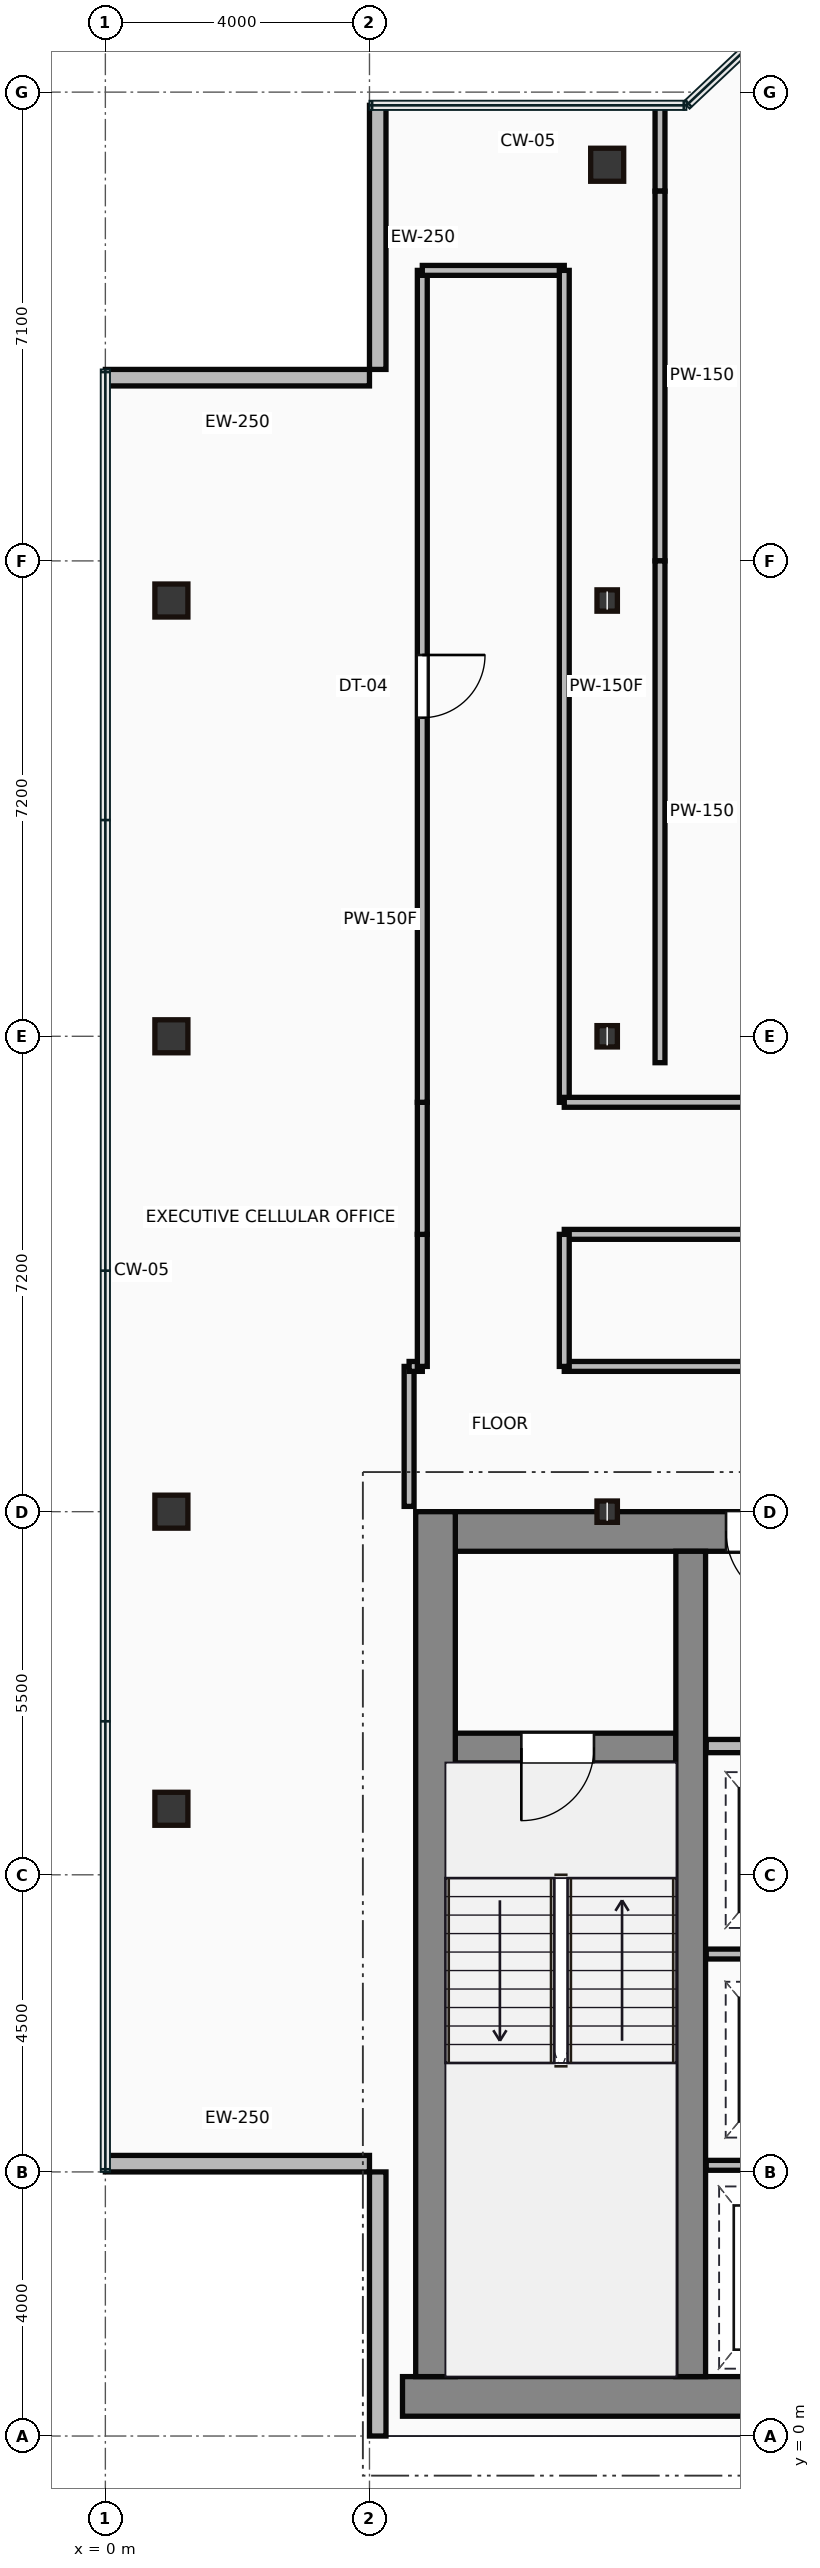
"""IFC4 building model, lengths in metres.
Left out: names, types, materials, properties, quantities, classifications, styles, units other than length and angle.
Written with IfcOpenShell. Run it as: python <this file> out.ifc"""

import sys

from ifc_helpers import new_model, si_unit, direction, frame, frame_2d, origin, origin_2d, place, context, subcontext, project, spatial, rectangle, hollow_rectangle, i_section, extrude, source, transform, mapped, element, fill, save


model = new_model("IFC4")
c1 = context("Model", 3, precision=1e-05, world=origin(), true_north=direction((0.0, 1.0)))
c2 = subcontext(c1, "Body", "Model", "MODEL_VIEW")
j1 = project(units=[si_unit("LENGTHUNIT", "METRE"), si_unit("PLANEANGLEUNIT", "RADIAN")], contexts=[c1])
p1 = place(None, origin())
s1 = spatial("IfcSite", under=j1, at=p1, CompositionType="ELEMENT")
p2 = place(p1, origin())
s2 = spatial("IfcBuilding", under=s1, at=p2, CompositionType="ELEMENT")
p3 = place(p2, frame((0.0, 0.0, 284.35)))
s3 = spatial("IfcBuildingStorey", under=s2, at=p3, CompositionType="ELEMENT", Elevation=284.35)
m1 = source(origin(), c2, "Body", "SweptSolid", [
    extrude(rectangle(XDim=29.5, YDim=0.6, at=frame_2d((14.75, 0.0))), origin(), (0.0, 0.0, 1.0), 3.65),
])
p4 = place(p3, frame((4.5, 0.6, 0.0), z_axis=(0.0, 0.0, 1.0), x_axis=(1.0, 0.0, 0.0)))
e1 = element("IfcWall", 1, at=p4, inside=s3, PredefinedType="SHEAR", context=c2, shape_type="MappedRepresentation", body=[
    mapped(m1, transform((0.0, 0.0, 0.0))),
])
m2 = source(origin(), c2, "Body", "SweptSolid", [
    extrude(rectangle(XDim=13.1, YDim=0.6, at=frame_2d((6.55, 0.0))), origin(), (0.0, 0.0, 1.0), 3.65),
])
p5 = place(p3, frame((5.0, 0.9, 0.0), z_axis=(0.0, 0.0, 1.0), x_axis=(0.0, 1.0, 0.0)))
e2 = element("IfcWall", 2, at=p5, inside=s3, PredefinedType="SHEAR", context=c2, shape_type="MappedRepresentation", body=[
    mapped(m2, transform((0.0, 0.0, 0.0))),
])
m3 = source(origin(), c2, "Body", "SweptSolid", [
    extrude(rectangle(XDim=9.1, YDim=0.6, at=frame_2d((4.55, 0.0))), origin(), (0.0, 0.0, 1.0), 3.65),
])
p6 = place(p3, frame((5.3, 13.7, 0.0), z_axis=(0.0, 0.0, 1.0), x_axis=(1.0, 0.0, 0.0)))
e3 = element("IfcWall", 3, at=p6, inside=s3, PredefinedType="SHEAR", context=c2, shape_type="MappedRepresentation", body=[
    mapped(m3, transform((0.0, 0.0, 0.0))),
])
p7 = place(p6, frame((4.1, 0.0, 0.0)))
e4 = element("IfcOpeningElement", 4, at=p7, cuts=e3, PredefinedType="OPENING", context=c2, shape_type="SweptSolid", body=[
    extrude(rectangle(XDim=1.1, YDim=2.15, at=frame_2d((0.55, 1.075))), frame((0.0, 0.31, 0.0), z_axis=(0.0, -1.0, 0.0), x_axis=(1.0, 0.0, 0.0)), (0.0, 0.0, 1.0), 0.62),
])
m4 = source(origin(), c2, "Body", "SweptSolid", [
    extrude(rectangle(XDim=12.5, YDim=0.45, at=frame_2d((6.25, 0.0))), origin(), (0.0, 0.0, 1.0), 3.65),
])
p8 = place(p3, frame((8.865, 0.9, 0.0), z_axis=(0.0, 0.0, 1.0), x_axis=(0.0, 1.0, 0.0)))
e5 = element("IfcWall", 5, at=p8, inside=s3, PredefinedType="SHEAR", context=c2, shape_type="MappedRepresentation", body=[
    mapped(m4, transform((0.0, 0.0, 0.0))),
])
m5 = source(origin(), c2, "Body", "SweptSolid", [
    extrude(rectangle(XDim=3.39, YDim=0.45, at=frame_2d((1.695, 0.0))), origin(), (0.0, 0.0, 1.0), 3.65),
])
p9 = place(p3, frame((5.25, 10.42, 0.0), z_axis=(0.0, 0.0, 1.0), x_axis=(1.0, 0.0, 0.0)))
e6 = element("IfcWall", 6, at=p9, inside=s3, PredefinedType="SHEAR", context=c2, shape_type="MappedRepresentation", body=[
    mapped(m5, transform((0.0, 0.0, 0.0))),
])
p10 = place(p9, frame((1.05, 0.0, 0.0)))
e7 = element("IfcOpeningElement", 7, at=p10, cuts=e6, PredefinedType="OPENING", context=c2, shape_type="SweptSolid", body=[
    extrude(rectangle(XDim=1.1, YDim=2.15, at=frame_2d((0.55, 1.075))), frame((0.0, 0.235, 0.0), z_axis=(0.0, -1.0, 0.0), x_axis=(1.0, 0.0, 0.0)), (0.0, 0.0, 1.0), 0.47),
])
m6 = source(origin(), c2, "Body", "SweptSolid", [
    extrude(hollow_rectangle(XDim=0.5, YDim=0.5, WallThickness=0.022, at=origin_2d()), origin(), (0.0, 0.0, 1.0), 3.65),
])
for number, where, z_axis, x_axis in (
    (8, (1.0, 9.5, 0.0), (0.0, 0.0, 1.0), (1.0, 0.0, 0.0)),
    (9, (1.0, 14.0, 0.0), (0.0, 0.0, 1.0), (1.0, 0.0, 0.0)),
    (10, (1.0, 21.2, 0.0), (0.0, 0.0, 1.0), (1.0, 0.0, 0.0)),
    (11, (1.0, 27.8, 0.0), (0.0, 0.0, 1.0), (1.0, 0.0, 0.0)),
):
    element("IfcColumn", number, at=place(p3, frame(where, z_axis=z_axis, x_axis=x_axis)), inside=s3, PredefinedType="COLUMN", context=c2, shape_type="MappedRepresentation", body=[
        mapped(m6, transform((0.0, 0.0, 0.0))),
    ])
m7 = source(origin(), c2, "Body", "SweptSolid", [
    extrude(i_section(OverallWidth=0.309, OverallDepth=0.323, WebThickness=0.014, FlangeThickness=0.023, at=origin_2d()), origin(), (0.0, 0.0, 1.0), 3.65),
])
for number, where, z_axis, x_axis in (
    (12, (7.6, 14.0, 0.0), (0.0, 0.0, 1.0), (1.0, 0.0, 0.0)),
    (13, (7.6, 21.2, 0.0), (0.0, 0.0, 1.0), (1.0, 0.0, 0.0)),
    (14, (7.6, 27.8, 0.0), (0.0, 0.0, 1.0), (1.0, 0.0, 0.0)),
):
    element("IfcColumn", number, at=place(p3, frame(where, z_axis=z_axis, x_axis=x_axis)), inside=s3, PredefinedType="COLUMN", context=c2, shape_type="MappedRepresentation", body=[
        mapped(m7, transform((0.0, 0.0, 0.0))),
    ])
p11 = place(p3, frame((7.6, 34.4, 0.0), z_axis=(0.0, 0.0, 1.0), x_axis=(1.0, 0.0, 0.0)))
e15 = element("IfcColumn", 15, at=p11, inside=s3, PredefinedType="COLUMN", context=c2, shape_type="MappedRepresentation", body=[
    mapped(m6, transform((0.0, 0.0, 0.0))),
])
m8 = source(origin(), c2, "Body", "SweptSolid", [
    extrude(rectangle(XDim=4.0, YDim=0.25, at=frame_2d((2.0, 0.0))), origin(), (0.0, 0.0, 1.0), 3.4),
])
for number, where, z_axis, x_axis in (
    (16, (4.125, 35.3, 0.0), (0.0, 0.0, 1.0), (0.0, -1.0, 0.0)),
    (17, (4.0, 31.175, 0.0), (0.0, 0.0, 1.0), (-1.0, 0.0, 0.0)),
    (18, (0.0, 4.125, 0.0), (0.0, 0.0, 1.0), (1.0, 0.0, 0.0)),
    (19, (4.125, 4.0, 0.0), (0.0, 0.0, 1.0), (0.0, -1.0, 0.0)),
):
    element("IfcWall", number, at=place(p3, frame(where, z_axis=z_axis, x_axis=x_axis)), inside=s3, PredefinedType="STANDARD", context=c2, shape_type="MappedRepresentation", body=[
        mapped(m8, transform((0.0, 0.0, 0.0))),
    ])
m9 = source(origin(), c2, "Body", "SweptSolid", [
    extrude(rectangle(XDim=2.35, YDim=0.2, at=frame_2d((1.175, 0.0))), origin(), (0.0, 0.0, 1.0), 3.4),
])
p12 = place(p3, frame((9.1, 10.45, 0.0), z_axis=(0.0, 0.0, 1.0), x_axis=(1.0, 0.0, 0.0)))
e20 = element("IfcWall", 20, at=p12, inside=s3, PredefinedType="PARTITIONING", context=c2, shape_type="MappedRepresentation", body=[
    mapped(m9, transform((0.0, 0.0, 0.0))),
])
p13 = place(p12, frame((0.55, 0.0, 0.0)))
e21 = element("IfcOpeningElement", 21, at=p13, cuts=e20, PredefinedType="OPENING", context=c2, shape_type="SweptSolid", body=[
    extrude(rectangle(XDim=1.1, YDim=2.15, at=frame_2d((0.55, 1.075))), frame((0.0, 0.11, 0.0), z_axis=(0.0, -1.0, 0.0), x_axis=(1.0, 0.0, 0.0)), (0.0, 0.0, 1.0), 0.22),
])
m10 = source(origin(), c2, "Body", "SweptSolid", [
    extrude(rectangle(XDim=2.4, YDim=0.15, at=frame_2d((1.2, 0.0))), origin(), (0.0, 0.0, 1.0), 3.4),
])
for number, where, z_axis, x_axis in (
    (22, (9.1, 4.1, 0.0), (0.0, 0.0, 1.0), (1.0, 0.0, 0.0)),
    (23, (9.1, 7.3, 0.0), (0.0, 0.0, 1.0), (1.0, 0.0, 0.0)),
):
    element("IfcWall", number, at=place(p3, frame(where, z_axis=z_axis, x_axis=x_axis)), inside=s3, PredefinedType="PARTITIONING", context=c2, shape_type="MappedRepresentation", body=[
        mapped(m10, transform((0.0, 0.0, 0.0))),
    ])
m11 = source(origin(), c2, "Body", "SweptSolid", [
    extrude(rectangle(XDim=2.12, YDim=0.15, at=frame_2d((1.06, 0.0))), origin(), (0.0, 0.0, 1.0), 3.4),
])
p14 = place(p3, frame((4.6, 14.08, 0.0), z_axis=(0.0, 0.0, 1.0), x_axis=(0.0, 1.0, 0.0)))
e24 = element("IfcWall", 24, at=p14, inside=s3, PredefinedType="PARTITIONING", context=c2, shape_type="MappedRepresentation", body=[
    mapped(m11, transform((0.0, 0.0, 0.0))),
])
m12 = source(origin(), c2, "Body", "SweptSolid", [
    extrude(rectangle(XDim=0.2, YDim=0.15, at=frame_2d((0.1, 0.0))), origin(), (0.0, 0.0, 1.0), 3.4),
])
p15 = place(p3, frame((4.6, 16.2, 0.0), z_axis=(0.0, 0.0, 1.0), x_axis=(1.0, 0.0, 0.0)))
e25 = element("IfcWall", 25, at=p15, inside=s3, PredefinedType="PARTITIONING", context=c2, shape_type="MappedRepresentation", body=[
    mapped(m12, transform((0.0, 0.0, 0.0))),
])
m13 = source(origin(), c2, "Body", "SweptSolid", [
    extrude(rectangle(XDim=2.0, YDim=0.15, at=frame_2d((1.0, 0.0))), origin(), (0.0, 0.0, 1.0), 3.4),
])
for number, where, z_axis, x_axis in (
    (26, (4.8, 16.2, 0.0), (0.0, 0.0, 1.0), (0.0, 1.0, 0.0)),
    (27, (4.8, 18.2, 0.0), (0.0, 0.0, 1.0), (0.0, 1.0, 0.0)),
):
    element("IfcWall", number, at=place(p3, frame(where, z_axis=z_axis, x_axis=x_axis)), inside=s3, PredefinedType="PARTITIONING", context=c2, shape_type="MappedRepresentation", body=[
        mapped(m13, transform((0.0, 0.0, 0.0))),
    ])
m14 = source(origin(), c2, "Body", "SweptSolid", [
    extrude(rectangle(XDim=12.6, YDim=0.15, at=frame_2d((6.3, 0.0))), origin(), (0.0, 0.0, 1.0), 3.4),
])
p16 = place(p3, frame((4.8, 20.2, 0.0), z_axis=(0.0, 0.0, 1.0), x_axis=(0.0, 1.0, 0.0)))
e28 = element("IfcWall", 28, at=p16, inside=s3, PredefinedType="PARTITIONING", context=c2, shape_type="MappedRepresentation", body=[
    mapped(m14, transform((0.0, 0.0, 0.0))),
])
p17 = place(p16, frame((5.825, 0.0, 0.0)))
e29 = element("IfcOpeningElement", 29, at=p17, cuts=e28, PredefinedType="OPENING", context=c2, shape_type="SweptSolid", body=[
    extrude(rectangle(XDim=0.95, YDim=2.15, at=frame_2d((0.475, 1.075))), frame((0.0, 0.085, 0.0), z_axis=(0.0, -1.0, 0.0), x_axis=(1.0, 0.0, 0.0)), (0.0, 0.0, 1.0), 0.17),
])
m15 = source(origin(), c2, "Body", "SweptSolid", [
    extrude(rectangle(XDim=2.15, YDim=0.15, at=frame_2d((1.075, 0.0))), origin(), (0.0, 0.0, 1.0), 3.4),
])
p18 = place(p3, frame((4.8, 32.8, 0.0), z_axis=(0.0, 0.0, 1.0), x_axis=(1.0, 0.0, 0.0)))
e30 = element("IfcWall", 30, at=p18, inside=s3, PredefinedType="PARTITIONING", context=c2, shape_type="MappedRepresentation", body=[
    mapped(m15, transform((0.0, 0.0, 0.0))),
])
p19 = place(p3, frame((6.95, 32.8, 0.0), z_axis=(0.0, 0.0, 1.0), x_axis=(0.0, -1.0, 0.0)))
e31 = element("IfcWall", 31, at=p19, inside=s3, PredefinedType="PARTITIONING", context=c2, shape_type="MappedRepresentation", body=[
    mapped(m14, transform((0.0, 0.0, 0.0))),
])
m16 = source(origin(), c2, "Body", "SweptSolid", [
    extrude(rectangle(XDim=23.25, YDim=0.15, at=frame_2d((11.625, 0.0))), origin(), (0.0, 0.0, 1.0), 3.4),
])
p20 = place(p3, frame((6.95, 20.2, 0.0), z_axis=(0.0, 0.0, 1.0), x_axis=(1.0, 0.0, 0.0)))
e32 = element("IfcWall", 32, at=p20, inside=s3, PredefinedType="PARTITIONING", context=c2, shape_type="MappedRepresentation", body=[
    mapped(m16, transform((0.0, 0.0, 0.0))),
])
p21 = place(p20, frame((9.175, 0.0, 0.0)))
e33 = element("IfcOpeningElement", 33, at=p21, cuts=e32, PredefinedType="OPENING", context=c2, shape_type="SweptSolid", body=[
    extrude(rectangle(XDim=0.95, YDim=2.15, at=frame_2d((0.475, 1.075))), frame((0.0, 0.085, 0.0), z_axis=(0.0, -1.0, 0.0), x_axis=(1.0, 0.0, 0.0)), (0.0, 0.0, 1.0), 0.17),
])
p22 = place(p3, frame((6.95, 16.2, 0.0), z_axis=(0.0, 0.0, 1.0), x_axis=(1.0, 0.0, 0.0)))
e34 = element("IfcWall", 34, at=p22, inside=s3, PredefinedType="PARTITIONING", context=c2, shape_type="MappedRepresentation", body=[
    mapped(m16, transform((0.0, 0.0, 0.0))),
])
p23 = place(p22, frame((4.38, 0.0, 0.0)))
e35 = element("IfcOpeningElement", 35, at=p23, cuts=e34, PredefinedType="OPENING", context=c2, shape_type="SweptSolid", body=[
    extrude(rectangle(XDim=0.95, YDim=2.15, at=frame_2d((0.475, 1.075))), frame((0.0, 0.085, 0.0), z_axis=(0.0, -1.0, 0.0), x_axis=(1.0, 0.0, 0.0)), (0.0, 0.0, 1.0), 0.17),
])
p24 = place(p22, frame((15.745, 0.0, 0.0)))
e36 = element("IfcOpeningElement", 36, at=p24, cuts=e34, PredefinedType="OPENING", context=c2, shape_type="SweptSolid", body=[
    extrude(rectangle(XDim=0.95, YDim=2.15, at=frame_2d((0.475, 1.075))), frame((0.0, 0.085, 0.0), z_axis=(0.0, -1.0, 0.0), x_axis=(1.0, 0.0, 0.0)), (0.0, 0.0, 1.0), 0.17),
])
p25 = place(p3, frame((30.2, 18.2, 0.0), z_axis=(0.0, 0.0, 1.0), x_axis=(-1.0, 0.0, 0.0)))
e37 = element("IfcWall", 37, at=p25, inside=s3, PredefinedType="PARTITIONING", context=c2, shape_type="MappedRepresentation", body=[
    mapped(m16, transform((0.0, 0.0, 0.0))),
])
p26 = place(p3, frame((6.95, 18.2, 0.0), z_axis=(0.0, 0.0, 1.0), x_axis=(0.0, -1.0, 0.0)))
e38 = element("IfcWall", 38, at=p26, inside=s3, PredefinedType="PARTITIONING", context=c2, shape_type="MappedRepresentation", body=[
    mapped(m13, transform((0.0, 0.0, 0.0))),
])
m17 = source(origin(), c2, "Body", "SweptSolid", [
    extrude(rectangle(XDim=1.28, YDim=0.15, at=frame_2d((0.64, 0.0))), origin(), (0.0, 0.0, 1.0), 3.4),
])
p27 = place(p3, frame((8.4, 35.28, 0.0), z_axis=(0.0, 0.0, 1.0), x_axis=(0.0, -1.0, 0.0)))
e39 = element("IfcWall", 39, at=p27, inside=s3, PredefinedType="PARTITIONING", context=c2, shape_type="MappedRepresentation", body=[
    mapped(m17, transform((0.0, 0.0, 0.0))),
])
m18 = source(origin(), c2, "Body", "SweptSolid", [
    extrude(rectangle(XDim=5.6, YDim=0.15, at=frame_2d((2.8, 0.0))), origin(), (0.0, 0.0, 1.0), 3.4),
])
p28 = place(p3, frame((8.4, 34.0, 0.0), z_axis=(0.0, 0.0, 1.0), x_axis=(0.0, -1.0, 0.0)))
e40 = element("IfcWall", 40, at=p28, inside=s3, PredefinedType="PARTITIONING", context=c2, shape_type="MappedRepresentation", body=[
    mapped(m18, transform((0.0, 0.0, 0.0))),
])
m19 = source(origin(), c2, "Body", "SweptSolid", [
    extrude(rectangle(XDim=7.6, YDim=0.15, at=frame_2d((3.8, 0.0))), origin(), (0.0, 0.0, 1.0), 3.4),
])
p29 = place(p3, frame((8.4, 28.4, 0.0), z_axis=(0.0, 0.0, 1.0), x_axis=(0.0, -1.0, 0.0)))
e41 = element("IfcWall", 41, at=p29, inside=s3, PredefinedType="PARTITIONING", context=c2, shape_type="MappedRepresentation", body=[
    mapped(m19, transform((0.0, 0.0, 0.0))),
])
m20 = source(origin(), c2, "Body", "SweptSolid", [
    extrude(rectangle(XDim=1.1, YDim=2.15, at=frame_2d((0.55, 1.075))), frame((0.0, 0.025, 0.0), z_axis=(0.0, -1.0, 0.0), x_axis=(1.0, 0.0, 0.0)), (0.0, 0.0, 1.0), 0.05),
])
p30 = place(p10, frame((1.1, 0.0, 0.0), z_axis=(0.0, 0.0, 1.0), x_axis=(-1.0, 0.0, 0.0)))
e42 = element("IfcDoor", 42, at=p30, inside=s3, OperationType="SINGLE_SWING_LEFT", PredefinedType="DOOR", context=c2, shape_type="MappedRepresentation", body=[
    mapped(m20, transform((0.0, 0.0, 0.0))),
])
fill(e7, e42)
p31 = place(p7, origin())
e43 = element("IfcDoor", 43, at=p31, inside=s3, OperationType="SINGLE_SWING_RIGHT", PredefinedType="DOOR", context=c2, shape_type="MappedRepresentation", body=[
    mapped(m20, transform((0.0, 0.0, 0.0))),
])
fill(e4, e43)
m21 = source(origin(), c2, "Body", "SweptSolid", [
    extrude(rectangle(XDim=0.95, YDim=2.15, at=frame_2d((0.475, 1.075))), frame((0.0, 0.025, 0.0), z_axis=(0.0, -1.0, 0.0), x_axis=(1.0, 0.0, 0.0)), (0.0, 0.0, 1.0), 0.05),
])
p32 = place(p17, origin())
e44 = element("IfcDoor", 44, at=p32, inside=s3, OperationType="SINGLE_SWING_RIGHT", PredefinedType="DOOR", context=c2, shape_type="MappedRepresentation", body=[
    mapped(m21, transform((0.0, 0.0, 0.0))),
])
fill(e29, e44)
save(model, sys.argv[1])
